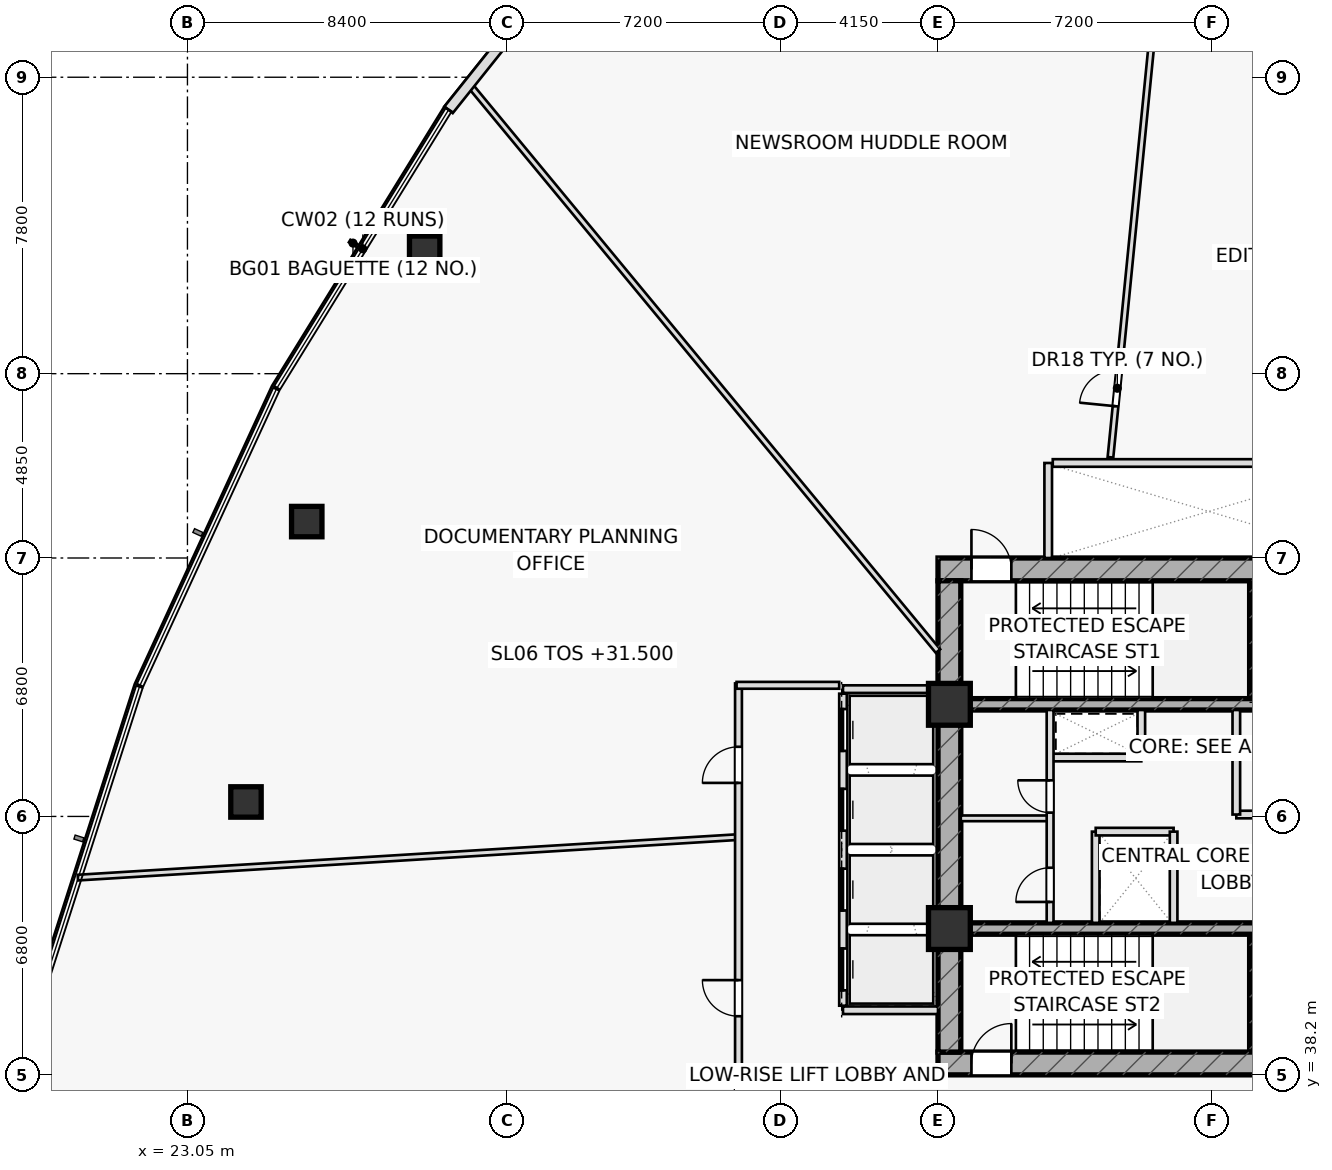
"""IFC4 building model, lengths in metres.
Left out: names, types, materials, properties, quantities, classifications, styles, units other than length and angle.
Written with IfcOpenShell. Run it as: python <this file> out.ifc"""

import sys

from ifc_helpers import new_model, si_unit, direction, frame, frame_2d, origin, origin_2d, place, context, subcontext, project, spatial, rectangle, hollow_rectangle, extrude, element, fill, save


model = new_model("IFC4")
c1 = context("Model", 3, precision=1e-05, world=origin(), true_north=direction((0.0, 1.0)))
c2 = subcontext(c1, "Body", "Model", "MODEL_VIEW")
j1 = project(units=[si_unit("LENGTHUNIT", "METRE"), si_unit("PLANEANGLEUNIT", "RADIAN")], contexts=[c1])
p1 = place(None, origin())
s1 = spatial("IfcSite", under=j1, at=p1, CompositionType="ELEMENT")
p2 = place(p1, origin())
s2 = spatial("IfcBuilding", under=s1, at=p2, CompositionType="ELEMENT")
p3 = place(p2, frame((0.0, 0.0, 31.5)))
s3 = spatial("IfcBuildingStorey", under=s2, at=p3, CompositionType="ELEMENT", Elevation=31.5)
for number, where, z_axis, x_axis in (
    (1, (51.11, 48.1, 0.0), (0.0, 0.0, 1.0), (0.0, 1.0, 0.0)),
    (2, (51.11, 38.8, 0.0), (0.0, 0.0, 1.0), (0.0, 1.0, 0.0)),
):
    element("IfcWall", number, at=place(p3, frame(where, z_axis=z_axis, x_axis=x_axis)), inside=s3, PredefinedType="SHEAR", context=c2, shape_type="SweptSolid", body=[
        extrude(rectangle(XDim=3.1, YDim=0.22, at=frame_2d((1.55, 0.0))), origin(), (0.0, 0.0, 1.0), 3.6),
    ])
p4 = place(p3, frame((42.8, 51.5, 0.0), z_axis=(0.0, 0.0, 1.0), x_axis=(1.0, 0.0, 0.0)))
e3 = element("IfcWall", 3, at=p4, inside=s3, PredefinedType="SHEAR", context=c2, shape_type="SweptSolid", body=[
    extrude(rectangle(XDim=14.4, YDim=0.6, at=frame_2d((7.2, 0.0))), origin(), (0.0, 0.0, 1.0), 3.6),
])
p5 = place(p4, frame((0.88, 0.0, 0.0)))
e4 = element("IfcOpeningElement", 4, at=p5, cuts=e3, PredefinedType="OPENING", context=c2, shape_type="SweptSolid", body=[
    extrude(rectangle(XDim=1.05, YDim=2.2, at=frame_2d((0.525, 1.1))), frame((0.0, 0.31, 0.0), z_axis=(0.0, -1.0, 0.0), x_axis=(1.0, 0.0, 0.0)), (0.0, 0.0, 1.0), 0.62),
])
p6 = place(p3, frame((42.8, 38.5, 0.0), z_axis=(0.0, 0.0, 1.0), x_axis=(1.0, 0.0, 0.0)))
e5 = element("IfcWall", 5, at=p6, inside=s3, PredefinedType="SHEAR", context=c2, shape_type="SweptSolid", body=[
    extrude(rectangle(XDim=14.4, YDim=0.6, at=frame_2d((7.2, 0.0))), origin(), (0.0, 0.0, 1.0), 3.6),
])
p7 = place(p6, frame((0.88, 0.0, 0.0)))
e6 = element("IfcOpeningElement", 6, at=p7, cuts=e5, PredefinedType="OPENING", context=c2, shape_type="SweptSolid", body=[
    extrude(rectangle(XDim=1.05, YDim=2.2, at=frame_2d((0.525, 1.1))), frame((0.0, 0.31, 0.0), z_axis=(0.0, -1.0, 0.0), x_axis=(1.0, 0.0, 0.0)), (0.0, 0.0, 1.0), 0.62),
])
p8 = place(p3, frame((43.1, 38.8, 0.0), z_axis=(0.0, 0.0, 1.0), x_axis=(0.0, 1.0, 0.0)))
e7 = element("IfcWall", 7, at=p8, inside=s3, PredefinedType="SHEAR", context=c2, shape_type="SweptSolid", body=[
    extrude(rectangle(XDim=12.4, YDim=0.6, at=frame_2d((6.2, 0.0))), origin(), (0.0, 0.0, 1.0), 3.6),
])
p9 = place(p3, frame((43.4, 47.95, 0.0), z_axis=(0.0, 0.0, 1.0), x_axis=(1.0, 0.0, 0.0)))
e8 = element("IfcWall", 8, at=p9, inside=s3, PredefinedType="SHEAR", context=c2, shape_type="SweptSolid", body=[
    extrude(rectangle(XDim=13.2, YDim=0.3, at=frame_2d((6.6, 0.0))), origin(), (0.0, 0.0, 1.0), 3.6),
])
p10 = place(p9, frame((8.345, 0.0, 0.0)))
e9 = element("IfcOpeningElement", 9, at=p10, cuts=e8, PredefinedType="OPENING", context=c2, shape_type="SweptSolid", body=[
    extrude(rectangle(XDim=1.15, YDim=2.2, at=frame_2d((0.575, 1.1))), frame((0.0, 0.16, 0.0), z_axis=(0.0, -1.0, 0.0), x_axis=(1.0, 0.0, 0.0)), (0.0, 0.0, 1.0), 0.32),
])
p11 = place(p9, frame((10.065, 0.0, 0.0)))
e10 = element("IfcOpeningElement", 10, at=p11, cuts=e8, PredefinedType="OPENING", context=c2, shape_type="SweptSolid", body=[
    extrude(rectangle(XDim=1.15, YDim=2.2, at=frame_2d((0.575, 1.1))), frame((0.0, 0.16, 0.0), z_axis=(0.0, -1.0, 0.0), x_axis=(1.0, 0.0, 0.0)), (0.0, 0.0, 1.0), 0.32),
])
p12 = place(p9, frame((11.645, 0.0, 0.0)))
e11 = element("IfcOpeningElement", 11, at=p12, cuts=e8, PredefinedType="OPENING", context=c2, shape_type="SweptSolid", body=[
    extrude(rectangle(XDim=1.15, YDim=2.2, at=frame_2d((0.575, 1.1))), frame((0.0, 0.16, 0.0), z_axis=(0.0, -1.0, 0.0), x_axis=(1.0, 0.0, 0.0)), (0.0, 0.0, 1.0), 0.32),
])
p13 = place(p3, frame((43.4, 42.05, 0.0), z_axis=(0.0, 0.0, 1.0), x_axis=(1.0, 0.0, 0.0)))
e12 = element("IfcWall", 12, at=p13, inside=s3, PredefinedType="SHEAR", context=c2, shape_type="SweptSolid", body=[
    extrude(rectangle(XDim=13.2, YDim=0.3, at=frame_2d((6.6, 0.0))), origin(), (0.0, 0.0, 1.0), 3.6),
])
for number, where, z_axis, x_axis in (
    (13, (43.1, 47.95, 0.0), (0.0, 0.0, 1.0), (1.0, 0.0, 0.0)),
    (14, (43.1, 42.05, 0.0), (0.0, 0.0, 1.0), (1.0, 0.0, 0.0)),
):
    element("IfcColumn", number, at=place(p3, frame(where, z_axis=z_axis, x_axis=x_axis)), inside=s3, PredefinedType="COLUMN", context=c2, shape_type="SweptSolid", body=[
        extrude(rectangle(XDim=1.1, YDim=1.1, at=origin_2d()), origin(), (0.0, 0.0, 1.0), 3.6),
    ])
for number, where, z_axis, x_axis in (
    (15, (29.292, 59.872, 0.0), (0.0, 0.0, 1.0), (1.0, 0.0, 0.0)),
    (16, (26.189, 52.758, 0.0), (0.0, 0.0, 1.0), (1.0, 0.0, 0.0)),
    (17, (24.59, 45.381, 0.0), (0.0, 0.0, 1.0), (1.0, 0.0, 0.0)),
):
    element("IfcColumn", number, at=place(p3, frame(where, z_axis=z_axis, x_axis=x_axis)), inside=s3, PredefinedType="COLUMN", context=c2, shape_type="SweptSolid", body=[
        extrude(hollow_rectangle(XDim=0.8, YDim=0.8, WallThickness=0.045, at=origin_2d()), origin(), (0.0, 0.0, 1.0), 3.6),
    ])
for number, where, z_axis, x_axis in (
    (18, (40.3, 39.9, 0.0), (0.0, 0.0, 1.0), (1.0, 0.0, 0.0)),
    (19, (40.3, 48.35, 0.0), (0.0, 0.0, 1.0), (1.0, 0.0, 0.0)),
    (20, (45.7, 51.8, 0.0), (0.0, 0.0, 1.0), (0.0, 1.0, 0.0)),
):
    element("IfcWall", number, at=place(p3, frame(where, z_axis=z_axis, x_axis=x_axis)), inside=s3, PredefinedType="PARTITIONING", context=c2, shape_type="SweptSolid", body=[
        extrude(rectangle(XDim=2.5, YDim=0.2, at=frame_2d((1.25, 0.0))), origin(), (0.0, 0.0, 1.0), 3.6),
    ])
p14 = place(p3, frame((45.75, 46.55, 0.0), z_axis=(0.0, 0.0, 1.0), x_axis=(1.0, 0.0, 0.0)))
e21 = element("IfcWall", 21, at=p14, inside=s3, PredefinedType="PARTITIONING", context=c2, shape_type="SweptSolid", body=[
    extrude(rectangle(XDim=2.4, YDim=0.2, at=frame_2d((1.2, 0.0))), origin(), (0.0, 0.0, 1.0), 3.6),
])
p15 = place(p3, frame((48.15, 46.55, 0.0), z_axis=(0.0, 0.0, 1.0), x_axis=(0.0, 1.0, 0.0)))
e22 = element("IfcWall", 22, at=p15, inside=s3, PredefinedType="PARTITIONING", context=c2, shape_type="SweptSolid", body=[
    extrude(rectangle(XDim=1.25, YDim=0.2, at=frame_2d((0.625, 0.0))), origin(), (0.0, 0.0, 1.0), 3.6),
])
p16 = place(p3, frame((46.95, 42.2, 0.0), z_axis=(0.0, 0.0, 1.0), x_axis=(0.0, 1.0, 0.0)))
e23 = element("IfcWall", 23, at=p16, inside=s3, PredefinedType="PARTITIONING", context=c2, shape_type="SweptSolid", body=[
    extrude(rectangle(XDim=2.4, YDim=0.2, at=frame_2d((1.2, 0.0))), origin(), (0.0, 0.0, 1.0), 3.6),
])
p17 = place(p3, frame((46.95, 44.6, 0.0), z_axis=(0.0, 0.0, 1.0), x_axis=(1.0, 0.0, 0.0)))
e24 = element("IfcWall", 24, at=p17, inside=s3, PredefinedType="PARTITIONING", context=c2, shape_type="SweptSolid", body=[
    extrude(rectangle(XDim=2.05, YDim=0.2, at=frame_2d((1.025, 0.0))), origin(), (0.0, 0.0, 1.0), 3.6),
])
p18 = place(p3, frame((50.65, 45.05, 0.0), z_axis=(0.0, 0.0, 1.0), x_axis=(1.0, 0.0, 0.0)))
e25 = element("IfcWall", 25, at=p18, inside=s3, PredefinedType="PARTITIONING", context=c2, shape_type="SweptSolid", body=[
    extrude(rectangle(XDim=5.95, YDim=0.2, at=frame_2d((2.975, 0.0))), origin(), (0.0, 0.0, 1.0), 3.6),
])
p19 = place(p18, frame((1.35, 0.0, 0.0)))
e26 = element("IfcOpeningElement", 26, at=p19, cuts=e25, PredefinedType="OPENING", context=c2, shape_type="SweptSolid", body=[
    extrude(rectangle(XDim=1.5, YDim=2.2, at=frame_2d((0.75, 1.1))), frame((0.0, 0.11, 0.0), z_axis=(0.0, -1.0, 0.0), x_axis=(1.0, 0.0, 0.0)), (0.0, 0.0, 1.0), 0.22),
])
p20 = place(p3, frame((50.65, 45.05, 0.0), z_axis=(0.0, 0.0, 1.0), x_axis=(0.0, 1.0, 0.0)))
e27 = element("IfcWall", 27, at=p20, inside=s3, PredefinedType="PARTITIONING", context=c2, shape_type="SweptSolid", body=[
    extrude(rectangle(XDim=2.75, YDim=0.2, at=frame_2d((1.375, 0.0))), origin(), (0.0, 0.0, 1.0), 3.6),
])
p21 = place(p3, frame((43.4, 44.95, 0.0), z_axis=(0.0, 0.0, 1.0), x_axis=(1.0, 0.0, 0.0)))
e28 = element("IfcWall", 28, at=p21, inside=s3, PredefinedType="PARTITIONING", context=c2, shape_type="SweptSolid", body=[
    extrude(rectangle(XDim=2.35, YDim=0.15, at=frame_2d((1.175, 0.0))), origin(), (0.0, 0.0, 1.0), 3.6),
])
p22 = place(p3, frame((45.75, 42.2, 0.0), z_axis=(0.0, 0.0, 1.0), x_axis=(0.0, 1.0, 0.0)))
e29 = element("IfcWall", 29, at=p22, inside=s3, PredefinedType="PARTITIONING", context=c2, shape_type="SweptSolid", body=[
    extrude(rectangle(XDim=5.6, YDim=0.18, at=frame_2d((2.8, 0.0))), origin(), (0.0, 0.0, 1.0), 3.6),
])
p23 = place(p22, frame((0.55, 0.0, 0.0)))
e30 = element("IfcOpeningElement", 30, at=p23, cuts=e29, PredefinedType="OPENING", context=c2, shape_type="SweptSolid", body=[
    extrude(rectangle(XDim=0.9, YDim=2.05, at=frame_2d((0.45, 1.025))), frame((0.0, 0.1, 0.0), z_axis=(0.0, -1.0, 0.0), x_axis=(1.0, 0.0, 0.0)), (0.0, 0.0, 1.0), 0.2),
])
p24 = place(p22, frame((2.9, 0.0, 0.0)))
e31 = element("IfcOpeningElement", 31, at=p24, cuts=e29, PredefinedType="OPENING", context=c2, shape_type="SweptSolid", body=[
    extrude(rectangle(XDim=0.85, YDim=2.05, at=frame_2d((0.425, 1.025))), frame((0.0, 0.1, 0.0), z_axis=(0.0, -1.0, 0.0), x_axis=(1.0, 0.0, 0.0)), (0.0, 0.0, 1.0), 0.2),
])
p25 = place(p3, frame((47.338, 54.45, 0.0), z_axis=(0.0, 0.0, 1.0), x_axis=(0.098804932586, 0.995106821048, 0.0)))
e32 = element("IfcWall", 32, at=p25, inside=s3, PredefinedType="PARTITIONING", context=c2, shape_type="SweptSolid", body=[
    extrude(rectangle(XDim=22.14, YDim=0.15, at=frame_2d((11.07, 0.0))), origin(), (0.0, 0.0, 1.0), 2.975),
])
p26 = place(p25, frame((1.35, 0.0, 0.0)))
e33 = element("IfcOpeningElement", 33, at=p26, cuts=e32, PredefinedType="OPENING", context=c2, shape_type="SweptSolid", body=[
    extrude(rectangle(XDim=0.95, YDim=2.05, at=frame_2d((0.475, 1.025))), frame((0.0, 0.085, 0.0), z_axis=(0.0, -1.0, 0.0), x_axis=(1.0, 0.0, 0.0)), (0.0, 0.0, 1.0), 0.17),
])
p27 = place(p3, frame((42.8, 49.351, 0.0), z_axis=(0.0, 0.0, 1.0), x_axis=(-0.637467614693, 0.770477151003, 0.0)))
e34 = element("IfcWall", 34, at=p27, inside=s3, PredefinedType="PARTITIONING", context=c2, shape_type="SweptSolid", body=[
    extrude(rectangle(XDim=19.368, YDim=0.15, at=frame_2d((9.684, 0.0))), origin(), (0.0, 0.0, 1.0), 2.925),
])
p28 = place(p3, frame((37.55, 44.457, 0.0), z_axis=(0.0, 0.0, 1.0), x_axis=(-0.998122788205, -0.061244588875, 0.0)))
e35 = element("IfcWall", 35, at=p28, inside=s3, PredefinedType="PARTITIONING", context=c2, shape_type="SweptSolid", body=[
    extrude(rectangle(XDim=17.416, YDim=0.15, at=frame_2d((8.708, 0.0))), origin(), (0.0, 0.0, 1.0), 2.975),
])
p29 = place(p3, frame((37.55, 35.75, 0.0), z_axis=(0.0, 0.0, 1.0), x_axis=(0.0, 1.0, 0.0)))
e36 = element("IfcWall", 36, at=p29, inside=s3, PredefinedType="PARTITIONING", context=c2, shape_type="SweptSolid", body=[
    extrude(rectangle(XDim=12.75, YDim=0.18, at=frame_2d((6.375, 0.0))), origin(), (0.0, 0.0, 1.0), 2.925),
])
p30 = place(p29, frame((3.993, 0.0, 0.0)))
e37 = element("IfcOpeningElement", 37, at=p30, cuts=e36, PredefinedType="OPENING", context=c2, shape_type="SweptSolid", body=[
    extrude(rectangle(XDim=0.95, YDim=2.05, at=frame_2d((0.475, 1.025))), frame((0.0, 0.1, 0.0), z_axis=(0.0, -1.0, 0.0), x_axis=(1.0, 0.0, 0.0)), (0.0, 0.0, 1.0), 0.2),
])
p31 = place(p29, frame((10.132, 0.0, 0.0)))
e38 = element("IfcOpeningElement", 38, at=p31, cuts=e36, PredefinedType="OPENING", context=c2, shape_type="SweptSolid", body=[
    extrude(rectangle(XDim=0.95, YDim=2.05, at=frame_2d((0.475, 1.025))), frame((0.0, 0.1, 0.0), z_axis=(0.0, -1.0, 0.0), x_axis=(1.0, 0.0, 0.0)), (0.0, 0.0, 1.0), 0.2),
])
p32 = place(p3, frame((37.5, 48.45, 0.0), z_axis=(0.0, 0.0, 1.0), x_axis=(1.0, 0.0, 0.0)))
e39 = element("IfcWall", 39, at=p32, inside=s3, PredefinedType="PARTITIONING", context=c2, shape_type="SweptSolid", body=[
    extrude(rectangle(XDim=2.7, YDim=0.18, at=frame_2d((1.35, 0.0))), origin(), (0.0, 0.0, 1.0), 3.6),
])
p33 = place(p3, frame((35.313, 70.34, 0.0), z_axis=(0.0, 0.0, 1.0), x_axis=(-0.624222665677, -0.781246480731, 0.0)))
e40 = element("IfcWall", 40, at=p33, inside=s3, PredefinedType="STANDARD", context=c2, shape_type="SweptSolid", body=[
    extrude(rectangle(XDim=8.637, YDim=0.28, at=frame_2d((4.318, 0.0))), origin(), (0.0, 0.0, 1.0), 3.6),
])
p34 = place(p3, frame((40.3, 40.02, 0.0), z_axis=(0.0, 0.0, 1.0), x_axis=(0.0, 1.0, 0.0)))
e41 = element("IfcWall", 41, at=p34, inside=s3, PredefinedType="PARTITIONING", context=c2, shape_type="SweptSolid", body=[
    extrude(rectangle(XDim=8.21, YDim=0.2, at=frame_2d((4.105, 0.0))), origin(), (0.0, 0.0, 1.0), 3.6),
])
p35 = place(p34, frame((0.405, 0.0, 0.0)))
e42 = element("IfcOpeningElement", 42, at=p35, cuts=e41, PredefinedType="OPENING", context=c2, shape_type="SweptSolid", body=[
    extrude(rectangle(XDim=1.1, YDim=2.15, at=frame_2d((0.55, 1.075))), frame((0.0, 0.11, 0.0), z_axis=(0.0, -1.0, 0.0), x_axis=(1.0, 0.0, 0.0)), (0.0, 0.0, 1.0), 0.22),
])
p36 = place(p34, frame((2.505, 0.0, 0.0)))
e43 = element("IfcOpeningElement", 43, at=p36, cuts=e41, PredefinedType="OPENING", context=c2, shape_type="SweptSolid", body=[
    extrude(rectangle(XDim=1.1, YDim=2.15, at=frame_2d((0.55, 1.075))), frame((0.0, 0.11, 0.0), z_axis=(0.0, -1.0, 0.0), x_axis=(1.0, 0.0, 0.0)), (0.0, 0.0, 1.0), 0.22),
])
p37 = place(p34, frame((4.605, 0.0, 0.0)))
e44 = element("IfcOpeningElement", 44, at=p37, cuts=e41, PredefinedType="OPENING", context=c2, shape_type="SweptSolid", body=[
    extrude(rectangle(XDim=1.1, YDim=2.15, at=frame_2d((0.55, 1.075))), frame((0.0, 0.11, 0.0), z_axis=(0.0, -1.0, 0.0), x_axis=(1.0, 0.0, 0.0)), (0.0, 0.0, 1.0), 0.22),
])
p38 = place(p34, frame((6.705, 0.0, 0.0)))
e45 = element("IfcOpeningElement", 45, at=p38, cuts=e41, PredefinedType="OPENING", context=c2, shape_type="SweptSolid", body=[
    extrude(rectangle(XDim=1.1, YDim=2.15, at=frame_2d((0.55, 1.075))), frame((0.0, 0.11, 0.0), z_axis=(0.0, -1.0, 0.0), x_axis=(1.0, 0.0, 0.0)), (0.0, 0.0, 1.0), 0.22),
])
p39 = place(p3, frame((49.0, 42.2, 0.0), z_axis=(0.0, 0.0, 1.0), x_axis=(0.0, 1.0, 0.0)))
e46 = element("IfcWall", 46, at=p39, inside=s3, PredefinedType="PARTITIONING", context=c2, shape_type="SweptSolid", body=[
    extrude(rectangle(XDim=2.4, YDim=0.2, at=frame_2d((1.2, 0.0))), origin(), (0.0, 0.0, 1.0), 3.6),
])
p40 = place(p3, frame((45.82, 54.3, 0.0), z_axis=(0.0, 0.0, 1.0), x_axis=(1.0, 0.0, 0.0)))
e47 = element("IfcWall", 47, at=p40, inside=s3, PredefinedType="PARTITIONING", context=c2, shape_type="SweptSolid", body=[
    extrude(rectangle(XDim=8.31, YDim=0.2, at=frame_2d((4.155, 0.0))), origin(), (0.0, 0.0, 1.0), 3.6),
])
p41 = place(p5, origin())
e48 = element("IfcDoor", 48, at=p41, inside=s3, OperationType="SINGLE_SWING_LEFT", PredefinedType="DOOR", context=c2, shape_type="SweptSolid", body=[
    extrude(rectangle(XDim=1.05, YDim=2.2, at=frame_2d((0.525, 1.1))), frame((0.0, 0.025, 0.0), z_axis=(0.0, -1.0, 0.0), x_axis=(1.0, 0.0, 0.0)), (0.0, 0.0, 1.0), 0.05),
])
fill(e4, e48)
p42 = place(p7, origin())
e49 = element("IfcDoor", 49, at=p42, inside=s3, OperationType="SINGLE_SWING_RIGHT", PredefinedType="DOOR", context=c2, shape_type="SweptSolid", body=[
    extrude(rectangle(XDim=1.05, YDim=2.2, at=frame_2d((0.525, 1.1))), frame((0.0, 0.025, 0.0), z_axis=(0.0, -1.0, 0.0), x_axis=(1.0, 0.0, 0.0)), (0.0, 0.0, 1.0), 0.05),
])
fill(e6, e49)
p43 = place(p23, origin())
e50 = element("IfcDoor", 50, at=p43, inside=s3, OperationType="SINGLE_SWING_LEFT", PredefinedType="DOOR", context=c2, shape_type="SweptSolid", body=[
    extrude(rectangle(XDim=0.9, YDim=2.05, at=frame_2d((0.45, 1.025))), frame((0.0, 0.025, 0.0), z_axis=(0.0, -1.0, 0.0), x_axis=(1.0, 0.0, 0.0)), (0.0, 0.0, 1.0), 0.05),
])
fill(e30, e50)
p44 = place(p24, origin())
e51 = element("IfcDoor", 51, at=p44, inside=s3, OperationType="SINGLE_SWING_RIGHT", PredefinedType="DOOR", context=c2, shape_type="SweptSolid", body=[
    extrude(rectangle(XDim=0.85, YDim=2.05, at=frame_2d((0.425, 1.025))), frame((0.0, 0.025, 0.0), z_axis=(0.0, -1.0, 0.0), x_axis=(1.0, 0.0, 0.0)), (0.0, 0.0, 1.0), 0.05),
])
fill(e31, e51)
p45 = place(p26, origin())
e52 = element("IfcDoor", 52, at=p45, inside=s3, OperationType="SINGLE_SWING_LEFT", PredefinedType="DOOR", context=c2, shape_type="SweptSolid", body=[
    extrude(rectangle(XDim=0.95, YDim=2.05, at=frame_2d((0.475, 1.025))), frame((0.0, 0.025, 0.0), z_axis=(0.0, -1.0, 0.0), x_axis=(1.0, 0.0, 0.0)), (0.0, 0.0, 1.0), 0.05),
])
fill(e33, e52)
p46 = place(p30, origin())
e53 = element("IfcDoor", 53, at=p46, inside=s3, OperationType="SINGLE_SWING_RIGHT", PredefinedType="DOOR", context=c2, shape_type="SweptSolid", body=[
    extrude(rectangle(XDim=0.95, YDim=2.05, at=frame_2d((0.475, 1.025))), frame((0.0, 0.025, 0.0), z_axis=(0.0, -1.0, 0.0), x_axis=(1.0, 0.0, 0.0)), (0.0, 0.0, 1.0), 0.05),
])
fill(e37, e53)
p47 = place(p31, origin())
e54 = element("IfcDoor", 54, at=p47, inside=s3, OperationType="SINGLE_SWING_LEFT", PredefinedType="DOOR", context=c2, shape_type="SweptSolid", body=[
    extrude(rectangle(XDim=0.95, YDim=2.05, at=frame_2d((0.475, 1.025))), frame((0.0, 0.025, 0.0), z_axis=(0.0, -1.0, 0.0), x_axis=(1.0, 0.0, 0.0)), (0.0, 0.0, 1.0), 0.05),
])
fill(e38, e54)
p48 = place(p35, origin())
e55 = element("IfcDoor", 55, at=p48, inside=s3, OperationType="SLIDING_TO_LEFT", PredefinedType="DOOR", context=c2, shape_type="SweptSolid", body=[
    extrude(rectangle(XDim=1.1, YDim=2.15, at=frame_2d((0.55, 1.075))), frame((0.0, 0.025, 0.0), z_axis=(0.0, -1.0, 0.0), x_axis=(1.0, 0.0, 0.0)), (0.0, 0.0, 1.0), 0.05),
])
fill(e42, e55)
p49 = place(p36, origin())
e56 = element("IfcDoor", 56, at=p49, inside=s3, OperationType="SLIDING_TO_RIGHT", PredefinedType="DOOR", context=c2, shape_type="SweptSolid", body=[
    extrude(rectangle(XDim=1.1, YDim=2.15, at=frame_2d((0.55, 1.075))), frame((0.0, 0.025, 0.0), z_axis=(0.0, -1.0, 0.0), x_axis=(1.0, 0.0, 0.0)), (0.0, 0.0, 1.0), 0.05),
])
fill(e43, e56)
p50 = place(p37, origin())
e57 = element("IfcDoor", 57, at=p50, inside=s3, OperationType="SLIDING_TO_LEFT", PredefinedType="DOOR", context=c2, shape_type="SweptSolid", body=[
    extrude(rectangle(XDim=1.1, YDim=2.15, at=frame_2d((0.55, 1.075))), frame((0.0, 0.025, 0.0), z_axis=(0.0, -1.0, 0.0), x_axis=(1.0, 0.0, 0.0)), (0.0, 0.0, 1.0), 0.05),
])
fill(e44, e57)
p51 = place(p38, origin())
e58 = element("IfcDoor", 58, at=p51, inside=s3, OperationType="SLIDING_TO_RIGHT", PredefinedType="DOOR", context=c2, shape_type="SweptSolid", body=[
    extrude(rectangle(XDim=1.1, YDim=2.15, at=frame_2d((0.55, 1.075))), frame((0.0, 0.025, 0.0), z_axis=(0.0, -1.0, 0.0), x_axis=(1.0, 0.0, 0.0)), (0.0, 0.0, 1.0), 0.05),
])
fill(e45, e58)
save(model, sys.argv[1])
